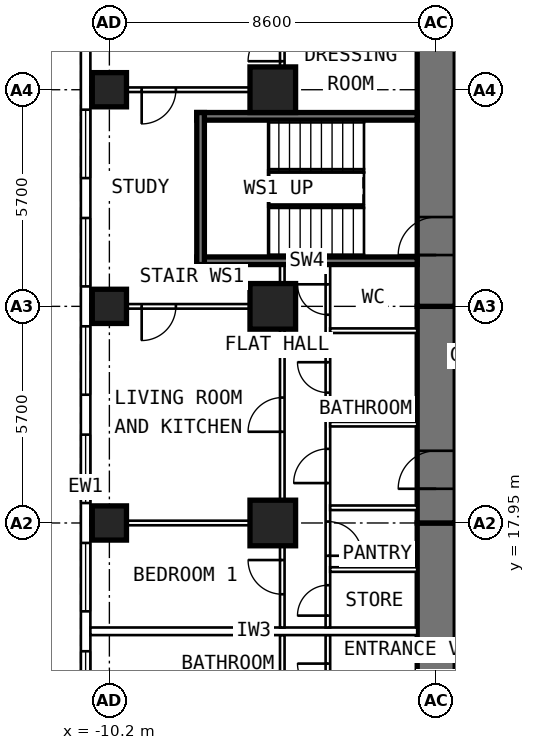
"""IFC4 building model, lengths in metres.
Left out: names, types, materials, properties, quantities, classifications, styles, units other than length and angle.
Written with IfcOpenShell. Run it as: python <this file> out.ifc"""

import sys

from ifc_helpers import new_model, si_unit, direction, frame, frame_2d, origin, origin_2d, place, context, subcontext, project, spatial, rectangle, extrude, element, fill, save


model = new_model("IFC4")
c1 = context("Model", 3, precision=1e-05, world=origin(), true_north=direction((0.0, 1.0)))
c2 = subcontext(c1, "Body", "Model", "MODEL_VIEW")
j1 = project(units=[si_unit("LENGTHUNIT", "METRE"), si_unit("PLANEANGLEUNIT", "RADIAN")], contexts=[c1])
p1 = place(None, origin())
s1 = spatial("IfcSite", under=j1, at=p1, CompositionType="ELEMENT")
p2 = place(p1, origin())
s2 = spatial("IfcBuilding", under=s1, at=p2, CompositionType="ELEMENT")
p3 = place(p2, frame((0.0, 0.0, 98.8)))
s3 = spatial("IfcBuildingStorey", under=s2, at=p3, CompositionType="ELEMENT", Elevation=98.8)
for number, where, z_axis, x_axis in (
    (1, (-10.2, 17.95, 0.0), (0.0, 0.0, 1.0), (0.0, 1.0, 0.0)),
    (2, (-10.2, 23.65, 0.0), (0.0, 0.0, 1.0), (0.0, 1.0, 0.0)),
    (3, (-10.2, 29.35, 0.0), (0.0, 0.0, 1.0), (0.0, 1.0, 0.0)),
):
    element("IfcColumn", number, at=place(p3, frame(where, z_axis=z_axis, x_axis=x_axis)), inside=s3, PredefinedType="COLUMN", context=c2, shape_type="SweptSolid", body=[
        extrude(rectangle(XDim=0.9, YDim=0.9, at=origin_2d()), origin(), (0.0, 0.0, 1.0), 3.6),
    ])
for number, where, z_axis, x_axis in (
    (4, (-5.9, 17.95, 0.0), (0.0, 0.0, 1.0), (0.0, 1.0, 0.0)),
    (5, (-5.9, 23.65, 0.0), (0.0, 0.0, 1.0), (0.0, 1.0, 0.0)),
    (6, (-5.9, 29.35, 0.0), (0.0, 0.0, 1.0), (0.0, 1.0, 0.0)),
):
    element("IfcColumn", number, at=place(p3, frame(where, z_axis=z_axis, x_axis=x_axis)), inside=s3, PredefinedType="COLUMN", context=c2, shape_type="SweptSolid", body=[
        extrude(rectangle(XDim=1.2, YDim=1.2, at=origin_2d()), origin(), (0.0, 0.0, 1.0), 3.6),
    ])
p4 = place(p3, frame((-1.6, 9.6, 0.0), z_axis=(0.0, 0.0, 1.0), x_axis=(0.0, 1.0, 0.0)))
e7 = element("IfcWall", 7, at=p4, inside=s3, PredefinedType="SHEAR", context=c2, shape_type="SweptSolid", body=[
    extrude(rectangle(XDim=8.35, YDim=1.0, at=frame_2d((4.175, 0.0))), origin(), (0.0, 0.0, 1.0), 3.6),
])
p5 = place(p4, frame((1.3, 0.0, 0.0)))
e8 = element("IfcOpeningElement", 8, at=p5, cuts=e7, PredefinedType="OPENING", context=c2, shape_type="SweptSolid", body=[
    extrude(rectangle(XDim=1.0, YDim=2.1, at=frame_2d((0.5, 1.05))), frame((0.0, 0.512, 0.0), z_axis=(0.0, -1.0, 0.0), x_axis=(1.0, 0.0, 0.0)), (0.0, 0.0, 1.0), 1.024),
])
p6 = place(p3, frame((-1.6, 17.95, 0.0), z_axis=(0.0, 0.0, 1.0), x_axis=(0.0, 1.0, 0.0)))
e9 = element("IfcWall", 9, at=p6, inside=s3, PredefinedType="SHEAR", context=c2, shape_type="SweptSolid", body=[
    extrude(rectangle(XDim=5.7, YDim=1.0, at=frame_2d((2.85, 0.0))), origin(), (0.0, 0.0, 1.0), 3.6),
])
p7 = place(p6, frame((0.9, 0.0, 0.0)))
e10 = element("IfcOpeningElement", 10, at=p7, cuts=e9, PredefinedType="OPENING", context=c2, shape_type="SweptSolid", body=[
    extrude(rectangle(XDim=1.0, YDim=2.1, at=frame_2d((0.5, 1.05))), frame((0.0, 0.512, 0.0), z_axis=(0.0, -1.0, 0.0), x_axis=(1.0, 0.0, 0.0)), (0.0, 0.0, 1.0), 1.024),
])
p8 = place(p3, frame((-1.6, 23.65, 0.0), z_axis=(0.0, 0.0, 1.0), x_axis=(0.0, 1.0, 0.0)))
e11 = element("IfcWall", 11, at=p8, inside=s3, PredefinedType="SHEAR", context=c2, shape_type="SweptSolid", body=[
    extrude(rectangle(XDim=10.745, YDim=1.0, at=frame_2d((5.373, 0.0))), origin(), (0.0, 0.0, 1.0), 3.6),
])
p9 = place(p8, frame((1.35, 0.0, 0.0)))
e12 = element("IfcOpeningElement", 12, at=p9, cuts=e11, PredefinedType="OPENING", context=c2, shape_type="SweptSolid", body=[
    extrude(rectangle(XDim=1.0, YDim=2.1, at=frame_2d((0.5, 1.05))), frame((0.0, 0.512, 0.0), z_axis=(0.0, -1.0, 0.0), x_axis=(1.0, 0.0, 0.0)), (0.0, 0.0, 1.0), 1.024),
])
p10 = place(p3, frame((-10.825, 6.148, 0.0), z_axis=(0.0, 0.0, 1.0), x_axis=(0.0, 1.0, 0.0)))
e13 = element("IfcWall", 13, at=p10, inside=s3, PredefinedType="SOLIDWALL", context=c2, shape_type="SweptSolid", body=[
    extrude(rectangle(XDim=25.487, YDim=0.25, at=frame_2d((12.744, 0.0))), origin(), (0.0, 0.0, 1.0), 3.35),
])
p11 = place(p10, frame((0.927, 0.0, 0.8)))
e14 = element("IfcOpeningElement", 14, at=p11, cuts=e13, PredefinedType="OPENING", context=c2, shape_type="SweptSolid", body=[
    extrude(rectangle(XDim=1.8, YDim=1.8, at=frame_2d((0.9, 0.9))), frame((0.0, 0.137, 0.0), z_axis=(0.0, -1.0, 0.0), x_axis=(1.0, 0.0, 0.0)), (0.0, 0.0, 1.0), 0.274),
])
p12 = place(p10, frame((3.777, 0.0, 0.8)))
e15 = element("IfcOpeningElement", 15, at=p12, cuts=e13, PredefinedType="OPENING", context=c2, shape_type="SweptSolid", body=[
    extrude(rectangle(XDim=1.8, YDim=1.8, at=frame_2d((0.9, 0.9))), frame((0.0, 0.137, 0.0), z_axis=(0.0, -1.0, 0.0), x_axis=(1.0, 0.0, 0.0)), (0.0, 0.0, 1.0), 0.274),
])
p13 = place(p10, frame((6.627, 0.0, 0.8)))
e16 = element("IfcOpeningElement", 16, at=p13, cuts=e13, PredefinedType="OPENING", context=c2, shape_type="SweptSolid", body=[
    extrude(rectangle(XDim=1.8, YDim=1.8, at=frame_2d((0.9, 0.9))), frame((0.0, 0.137, 0.0), z_axis=(0.0, -1.0, 0.0), x_axis=(1.0, 0.0, 0.0)), (0.0, 0.0, 1.0), 0.274),
])
p14 = place(p10, frame((9.477, 0.0, 0.8)))
e17 = element("IfcOpeningElement", 17, at=p14, cuts=e13, PredefinedType="OPENING", context=c2, shape_type="SweptSolid", body=[
    extrude(rectangle(XDim=1.8, YDim=1.8, at=frame_2d((0.9, 0.9))), frame((0.0, 0.137, 0.0), z_axis=(0.0, -1.0, 0.0), x_axis=(1.0, 0.0, 0.0)), (0.0, 0.0, 1.0), 0.274),
])
p15 = place(p10, frame((12.327, 0.0, 0.8)))
e18 = element("IfcOpeningElement", 18, at=p15, cuts=e13, PredefinedType="OPENING", context=c2, shape_type="SweptSolid", body=[
    extrude(rectangle(XDim=1.8, YDim=1.8, at=frame_2d((0.9, 0.9))), frame((0.0, 0.137, 0.0), z_axis=(0.0, -1.0, 0.0), x_axis=(1.0, 0.0, 0.0)), (0.0, 0.0, 1.0), 0.274),
])
p16 = place(p10, frame((15.177, 0.0, 0.8)))
e19 = element("IfcOpeningElement", 19, at=p16, cuts=e13, PredefinedType="OPENING", context=c2, shape_type="SweptSolid", body=[
    extrude(rectangle(XDim=1.8, YDim=1.8, at=frame_2d((0.9, 0.9))), frame((0.0, 0.137, 0.0), z_axis=(0.0, -1.0, 0.0), x_axis=(1.0, 0.0, 0.0)), (0.0, 0.0, 1.0), 0.274),
])
p17 = place(p10, frame((18.027, 0.0, 0.8)))
e20 = element("IfcOpeningElement", 20, at=p17, cuts=e13, PredefinedType="OPENING", context=c2, shape_type="SweptSolid", body=[
    extrude(rectangle(XDim=1.8, YDim=1.8, at=frame_2d((0.9, 0.9))), frame((0.0, 0.137, 0.0), z_axis=(0.0, -1.0, 0.0), x_axis=(1.0, 0.0, 0.0)), (0.0, 0.0, 1.0), 0.274),
])
p18 = place(p10, frame((20.877, 0.0, 0.8)))
e21 = element("IfcOpeningElement", 21, at=p18, cuts=e13, PredefinedType="OPENING", context=c2, shape_type="SweptSolid", body=[
    extrude(rectangle(XDim=1.8, YDim=1.8, at=frame_2d((0.9, 0.9))), frame((0.0, 0.137, 0.0), z_axis=(0.0, -1.0, 0.0), x_axis=(1.0, 0.0, 0.0)), (0.0, 0.0, 1.0), 0.274),
])
p19 = place(p3, frame((-4.45, 10.1, 0.0), z_axis=(0.0, 0.0, 1.0), x_axis=(0.0, 1.0, 0.0)))
e22 = element("IfcWall", 22, at=p19, inside=s3, PredefinedType="PARTITIONING", context=c2, shape_type="SweptSolid", body=[
    extrude(rectangle(XDim=4.9, YDim=0.12, at=frame_2d((2.45, 0.0))), origin(), (0.0, 0.0, 1.0), 3.35),
])
p20 = place(p19, frame((0.75, 0.0, 0.0)))
e23 = element("IfcOpeningElement", 23, at=p20, cuts=e22, PredefinedType="OPENING", context=c2, shape_type="SweptSolid", body=[
    extrude(rectangle(XDim=0.9, YDim=2.1, at=frame_2d((0.45, 1.05))), frame((0.0, 0.072, 0.0), z_axis=(0.0, -1.0, 0.0), x_axis=(1.0, 0.0, 0.0)), (0.0, 0.0, 1.0), 0.144),
])
p21 = place(p19, frame((3.35, 0.0, 0.0)))
e24 = element("IfcOpeningElement", 24, at=p21, cuts=e22, PredefinedType="OPENING", context=c2, shape_type="SweptSolid", body=[
    extrude(rectangle(XDim=0.8, YDim=2.1, at=frame_2d((0.4, 1.05))), frame((0.0, 0.072, 0.0), z_axis=(0.0, -1.0, 0.0), x_axis=(1.0, 0.0, 0.0)), (0.0, 0.0, 1.0), 0.144),
])
p22 = place(p3, frame((-5.65, 9.6, 0.0), z_axis=(0.0, 0.0, 1.0), x_axis=(0.0, 1.0, 0.0)))
e25 = element("IfcWall", 25, at=p22, inside=s3, PredefinedType="PARTITIONING", context=c2, shape_type="SweptSolid", body=[
    extrude(rectangle(XDim=5.4, YDim=0.12, at=frame_2d((2.7, 0.0))), origin(), (0.0, 0.0, 1.0), 3.35),
])
p23 = place(p22, frame((3.4, 0.0, 0.0)))
e26 = element("IfcOpeningElement", 26, at=p23, cuts=e25, PredefinedType="OPENING", context=c2, shape_type="SweptSolid", body=[
    extrude(rectangle(XDim=0.9, YDim=2.1, at=frame_2d((0.45, 1.05))), frame((0.0, 0.072, 0.0), z_axis=(0.0, -1.0, 0.0), x_axis=(1.0, 0.0, 0.0)), (0.0, 0.0, 1.0), 0.144),
])
p24 = place(p3, frame((-4.45, 15.2, 0.0), z_axis=(0.0, 0.0, 1.0), x_axis=(0.0, 1.0, 0.0)))
e27 = element("IfcWall", 27, at=p24, inside=s3, PredefinedType="PARTITIONING", context=c2, shape_type="SweptSolid", body=[
    extrude(rectangle(XDim=9.55, YDim=0.12, at=frame_2d((4.775, 0.0))), origin(), (0.0, 0.0, 1.0), 3.35),
])
p25 = place(p24, frame((0.312, 0.0, 0.0)))
e28 = element("IfcOpeningElement", 28, at=p25, cuts=e27, PredefinedType="OPENING", context=c2, shape_type="SweptSolid", body=[
    extrude(rectangle(XDim=0.8, YDim=2.1, at=frame_2d((0.4, 1.05))), frame((0.0, 0.072, 0.0), z_axis=(0.0, -1.0, 0.0), x_axis=(1.0, 0.0, 0.0)), (0.0, 0.0, 1.0), 0.144),
])
p26 = place(p24, frame((1.887, 0.0, 0.0)))
e29 = element("IfcOpeningElement", 29, at=p26, cuts=e27, PredefinedType="OPENING", context=c2, shape_type="SweptSolid", body=[
    extrude(rectangle(XDim=0.9, YDim=2.1, at=frame_2d((0.45, 1.05))), frame((0.0, 0.072, 0.0), z_axis=(0.0, -1.0, 0.0), x_axis=(1.0, 0.0, 0.0)), (0.0, 0.0, 1.0), 0.144),
])
p27 = place(p24, frame((3.8, 0.0, 0.0)))
e30 = element("IfcOpeningElement", 30, at=p27, cuts=e27, PredefinedType="OPENING", context=c2, shape_type="SweptSolid", body=[
    extrude(rectangle(XDim=0.9, YDim=2.1, at=frame_2d((0.45, 1.05))), frame((0.0, 0.072, 0.0), z_axis=(0.0, -1.0, 0.0), x_axis=(1.0, 0.0, 0.0)), (0.0, 0.0, 1.0), 0.144),
])
p28 = place(p24, frame((6.18, 0.0, 0.0)))
e31 = element("IfcOpeningElement", 31, at=p28, cuts=e27, PredefinedType="OPENING", context=c2, shape_type="SweptSolid", body=[
    extrude(rectangle(XDim=0.8, YDim=2.1, at=frame_2d((0.4, 1.05))), frame((0.0, 0.072, 0.0), z_axis=(0.0, -1.0, 0.0), x_axis=(1.0, 0.0, 0.0)), (0.0, 0.0, 1.0), 0.144),
])
p29 = place(p24, frame((8.23, 0.0, 0.0)))
e32 = element("IfcOpeningElement", 32, at=p29, cuts=e27, PredefinedType="OPENING", context=c2, shape_type="SweptSolid", body=[
    extrude(rectangle(XDim=0.8, YDim=2.1, at=frame_2d((0.4, 1.05))), frame((0.0, 0.072, 0.0), z_axis=(0.0, -1.0, 0.0), x_axis=(1.0, 0.0, 0.0)), (0.0, 0.0, 1.0), 0.144),
])
p30 = place(p3, frame((-5.65, 15.2, 0.0), z_axis=(0.0, 0.0, 1.0), x_axis=(0.0, 1.0, 0.0)))
e33 = element("IfcWall", 33, at=p30, inside=s3, PredefinedType="PARTITIONING", context=c2, shape_type="SweptSolid", body=[
    extrude(rectangle(XDim=9.55, YDim=0.12, at=frame_2d((4.775, 0.0))), origin(), (0.0, 0.0, 1.0), 3.35),
])
p31 = place(p30, frame((0.875, 0.0, 0.0)))
e34 = element("IfcOpeningElement", 34, at=p31, cuts=e33, PredefinedType="OPENING", context=c2, shape_type="SweptSolid", body=[
    extrude(rectangle(XDim=0.9, YDim=2.1, at=frame_2d((0.45, 1.05))), frame((0.0, 0.072, 0.0), z_axis=(0.0, -1.0, 0.0), x_axis=(1.0, 0.0, 0.0)), (0.0, 0.0, 1.0), 0.144),
])
p32 = place(p30, frame((5.15, 0.0, 0.0)))
e35 = element("IfcOpeningElement", 35, at=p32, cuts=e33, PredefinedType="OPENING", context=c2, shape_type="SweptSolid", body=[
    extrude(rectangle(XDim=0.9, YDim=2.1, at=frame_2d((0.45, 1.05))), frame((0.0, 0.072, 0.0), z_axis=(0.0, -1.0, 0.0), x_axis=(1.0, 0.0, 0.0)), (0.0, 0.0, 1.0), 0.144),
])
p33 = place(p3, frame((-5.71, 17.95, 0.0), z_axis=(0.0, 0.0, 1.0), x_axis=(-1.0, 0.0, 0.0)))
e36 = element("IfcWall", 36, at=p33, inside=s3, PredefinedType="PARTITIONING", context=c2, shape_type="SweptSolid", body=[
    extrude(rectangle(XDim=4.99, YDim=0.12, at=frame_2d((2.495, 0.0))), origin(), (0.0, 0.0, 1.0), 2.45),
])
for number, where, z_axis, x_axis in (
    (37, (-2.1, 16.725, 0.0), (0.0, 0.0, 1.0), (-1.0, 0.0, 0.0)),
    (38, (-2.1, 18.35, 0.0), (0.0, 0.0, 1.0), (-1.0, 0.0, 0.0)),
    (39, (-2.1, 20.55, 0.0), (0.0, 0.0, 1.0), (-1.0, 0.0, 0.0)),
    (40, (-2.1, 23.01, 0.0), (0.0, 0.0, 1.0), (-1.0, 0.0, 0.0)),
):
    element("IfcWall", number, at=place(p3, frame(where, z_axis=z_axis, x_axis=x_axis)), inside=s3, PredefinedType="PARTITIONING", context=c2, shape_type="SweptSolid", body=[
        extrude(rectangle(XDim=2.29, YDim=0.12, at=frame_2d((1.145, 0.0))), origin(), (0.0, 0.0, 1.0), 3.35),
    ])
p34 = place(p3, frame((-2.1, 15.1, 0.0), z_axis=(0.0, 0.0, 1.0), x_axis=(-1.0, 0.0, 0.0)))
e41 = element("IfcWall", 41, at=p34, inside=s3, PredefinedType="PARTITIONING", context=c2, shape_type="SweptSolid", body=[
    extrude(rectangle(XDim=8.6, YDim=0.2, at=frame_2d((4.3, 0.0))), origin(), (0.0, 0.0, 1.0), 3.35),
])
p35 = place(p3, frame((-5.71, 23.65, 0.0), z_axis=(0.0, 0.0, 1.0), x_axis=(-1.0, 0.0, 0.0)))
e42 = element("IfcWall", 42, at=p35, inside=s3, PredefinedType="PARTITIONING", context=c2, shape_type="SweptSolid", body=[
    extrude(rectangle(XDim=4.99, YDim=0.12, at=frame_2d((2.495, 0.0))), origin(), (0.0, 0.0, 1.0), 2.45),
])
p36 = place(p35, frame((2.74, 0.0, 0.0)))
e43 = element("IfcOpeningElement", 43, at=p36, cuts=e42, PredefinedType="OPENING", context=c2, shape_type="SweptSolid", body=[
    extrude(rectangle(XDim=0.9, YDim=2.1, at=frame_2d((0.45, 1.05))), frame((0.0, 0.072, 0.0), z_axis=(0.0, -1.0, 0.0), x_axis=(1.0, 0.0, 0.0)), (0.0, 0.0, 1.0), 0.144),
])
p37 = place(p3, frame((-5.71, 29.35, 0.0), z_axis=(0.0, 0.0, 1.0), x_axis=(-1.0, 0.0, 0.0)))
e44 = element("IfcWall", 44, at=p37, inside=s3, PredefinedType="PARTITIONING", context=c2, shape_type="SweptSolid", body=[
    extrude(rectangle(XDim=4.99, YDim=0.12, at=frame_2d((2.495, 0.0))), origin(), (0.0, 0.0, 1.0), 2.45),
])
p38 = place(p37, frame((2.74, 0.0, 0.0)))
e45 = element("IfcOpeningElement", 45, at=p38, cuts=e44, PredefinedType="OPENING", context=c2, shape_type="SweptSolid", body=[
    extrude(rectangle(XDim=0.9, YDim=2.1, at=frame_2d((0.45, 1.05))), frame((0.0, 0.072, 0.0), z_axis=(0.0, -1.0, 0.0), x_axis=(1.0, 0.0, 0.0)), (0.0, 0.0, 1.0), 0.144),
])
p39 = place(p3, frame((-5.65, 28.95, 0.0), z_axis=(0.0, 0.0, 1.0), x_axis=(0.0, 1.0, 0.0)))
e46 = element("IfcWall", 46, at=p39, inside=s3, PredefinedType="PARTITIONING", context=c2, shape_type="SweptSolid", body=[
    extrude(rectangle(XDim=5.445, YDim=0.12, at=frame_2d((2.723, 0.0))), origin(), (0.0, 0.0, 1.0), 3.35),
])
p40 = place(p39, frame((1.15, 0.0, 0.0)))
e47 = element("IfcOpeningElement", 47, at=p40, cuts=e46, PredefinedType="OPENING", context=c2, shape_type="SweptSolid", body=[
    extrude(rectangle(XDim=0.9, YDim=2.1, at=frame_2d((0.45, 1.05))), frame((0.0, 0.072, 0.0), z_axis=(0.0, -1.0, 0.0), x_axis=(1.0, 0.0, 0.0)), (0.0, 0.0, 1.0), 0.144),
])
for number, where, z_axis, x_axis in (
    (48, (-2.1, 24.85, 0.0), (0.0, 0.0, 1.0), (-1.0, 0.0, 0.0)),
    (49, (-2.1, 28.65, 0.0), (0.0, 0.0, 1.0), (-1.0, 0.0, 0.0)),
):
    element("IfcWall", number, at=place(p3, frame(where, z_axis=z_axis, x_axis=x_axis)), inside=s3, PredefinedType="SHEAR", context=c2, shape_type="SweptSolid", body=[
        extrude(rectangle(XDim=5.8, YDim=0.2, at=frame_2d((2.9, 0.0))), origin(), (0.0, 0.0, 1.0), 3.33),
    ])
p41 = place(p3, frame((-7.8, 24.75, 0.0), z_axis=(0.0, 0.0, 1.0), x_axis=(0.0, 1.0, 0.0)))
e50 = element("IfcWall", 50, at=p41, inside=s3, PredefinedType="SHEAR", context=c2, shape_type="SweptSolid", body=[
    extrude(rectangle(XDim=4.0, YDim=0.2, at=frame_2d((2.0, 0.0))), origin(), (0.0, 0.0, 1.0), 3.33),
])
p42 = place(p13, origin())
e51 = element("IfcWindow", 51, at=p42, inside=s3, PartitioningType="SINGLE_PANEL", PredefinedType="WINDOW", context=c2, shape_type="SweptSolid", body=[
    extrude(rectangle(XDim=1.8, YDim=1.8, at=frame_2d((0.9, 0.9))), frame((0.0, 0.03, 0.0), z_axis=(0.0, -1.0, 0.0), x_axis=(1.0, 0.0, 0.0)), (0.0, 0.0, 1.0), 0.06),
])
fill(e16, e51)
p43 = place(p14, origin())
e52 = element("IfcWindow", 52, at=p43, inside=s3, PartitioningType="SINGLE_PANEL", PredefinedType="WINDOW", context=c2, shape_type="SweptSolid", body=[
    extrude(rectangle(XDim=1.8, YDim=1.8, at=frame_2d((0.9, 0.9))), frame((0.0, 0.03, 0.0), z_axis=(0.0, -1.0, 0.0), x_axis=(1.0, 0.0, 0.0)), (0.0, 0.0, 1.0), 0.06),
])
fill(e17, e52)
p44 = place(p15, origin())
e53 = element("IfcWindow", 53, at=p44, inside=s3, PartitioningType="SINGLE_PANEL", PredefinedType="WINDOW", context=c2, shape_type="SweptSolid", body=[
    extrude(rectangle(XDim=1.8, YDim=1.8, at=frame_2d((0.9, 0.9))), frame((0.0, 0.03, 0.0), z_axis=(0.0, -1.0, 0.0), x_axis=(1.0, 0.0, 0.0)), (0.0, 0.0, 1.0), 0.06),
])
fill(e18, e53)
p45 = place(p16, origin())
e54 = element("IfcWindow", 54, at=p45, inside=s3, PartitioningType="SINGLE_PANEL", PredefinedType="WINDOW", context=c2, shape_type="SweptSolid", body=[
    extrude(rectangle(XDim=1.8, YDim=1.8, at=frame_2d((0.9, 0.9))), frame((0.0, 0.03, 0.0), z_axis=(0.0, -1.0, 0.0), x_axis=(1.0, 0.0, 0.0)), (0.0, 0.0, 1.0), 0.06),
])
fill(e19, e54)
p46 = place(p17, origin())
e55 = element("IfcWindow", 55, at=p46, inside=s3, PartitioningType="SINGLE_PANEL", PredefinedType="WINDOW", context=c2, shape_type="SweptSolid", body=[
    extrude(rectangle(XDim=1.8, YDim=1.8, at=frame_2d((0.9, 0.9))), frame((0.0, 0.03, 0.0), z_axis=(0.0, -1.0, 0.0), x_axis=(1.0, 0.0, 0.0)), (0.0, 0.0, 1.0), 0.06),
])
fill(e20, e55)
p47 = place(p18, origin())
e56 = element("IfcWindow", 56, at=p47, inside=s3, PartitioningType="SINGLE_PANEL", PredefinedType="WINDOW", context=c2, shape_type="SweptSolid", body=[
    extrude(rectangle(XDim=1.8, YDim=1.8, at=frame_2d((0.9, 0.9))), frame((0.0, 0.03, 0.0), z_axis=(0.0, -1.0, 0.0), x_axis=(1.0, 0.0, 0.0)), (0.0, 0.0, 1.0), 0.06),
])
fill(e21, e56)
p48 = place(p21, origin())
e57 = element("IfcDoor", 57, at=p48, inside=s3, OperationType="SINGLE_SWING_RIGHT", PredefinedType="DOOR", context=c2, shape_type="SweptSolid", body=[
    extrude(rectangle(XDim=0.8, YDim=2.1, at=frame_2d((0.4, 1.05))), frame((0.0, 0.025, 0.0), z_axis=(0.0, -1.0, 0.0), x_axis=(1.0, 0.0, 0.0)), (0.0, 0.0, 1.0), 0.05),
])
fill(e24, e57)
p49 = place(p7, origin())
e58 = element("IfcDoor", 58, at=p49, inside=s3, OperationType="SINGLE_SWING_LEFT", PredefinedType="DOOR", context=c2, shape_type="SweptSolid", body=[
    extrude(rectangle(XDim=1.0, YDim=2.1, at=frame_2d((0.5, 1.05))), frame((0.0, 0.25, 0.0), z_axis=(0.0, -1.0, 0.0), x_axis=(1.0, 0.0, 0.0)), (0.0, 0.0, 1.0), 0.5),
])
fill(e10, e58)
p50 = place(p31, origin())
e59 = element("IfcDoor", 59, at=p50, inside=s3, OperationType="SINGLE_SWING_RIGHT", PredefinedType="DOOR", context=c2, shape_type="SweptSolid", body=[
    extrude(rectangle(XDim=0.9, YDim=2.1, at=frame_2d((0.45, 1.05))), frame((0.0, 0.025, 0.0), z_axis=(0.0, -1.0, 0.0), x_axis=(1.0, 0.0, 0.0)), (0.0, 0.0, 1.0), 0.05),
])
fill(e34, e59)
p51 = place(p32, origin())
e60 = element("IfcDoor", 60, at=p51, inside=s3, OperationType="SINGLE_SWING_LEFT", PredefinedType="DOOR", context=c2, shape_type="SweptSolid", body=[
    extrude(rectangle(XDim=0.9, YDim=2.1, at=frame_2d((0.45, 1.05))), frame((0.0, 0.025, 0.0), z_axis=(0.0, -1.0, 0.0), x_axis=(1.0, 0.0, 0.0)), (0.0, 0.0, 1.0), 0.05),
])
fill(e35, e60)
p52 = place(p25, origin())
e61 = element("IfcDoor", 61, at=p52, inside=s3, OperationType="SINGLE_SWING_LEFT", PredefinedType="DOOR", context=c2, shape_type="SweptSolid", body=[
    extrude(rectangle(XDim=0.8, YDim=2.1, at=frame_2d((0.4, 1.05))), frame((0.0, 0.025, 0.0), z_axis=(0.0, -1.0, 0.0), x_axis=(1.0, 0.0, 0.0)), (0.0, 0.0, 1.0), 0.05),
])
fill(e28, e61)
p53 = place(p26, frame((0.9, 0.0, 0.0), z_axis=(0.0, 0.0, 1.0), x_axis=(-1.0, 0.0, 0.0)))
e62 = element("IfcDoor", 62, at=p53, inside=s3, OperationType="SINGLE_SWING_RIGHT", PredefinedType="DOOR", context=c2, shape_type="SweptSolid", body=[
    extrude(rectangle(XDim=0.9, YDim=2.1, at=frame_2d((0.45, 1.05))), frame((0.0, 0.025, 0.0), z_axis=(0.0, -1.0, 0.0), x_axis=(1.0, 0.0, 0.0)), (0.0, 0.0, 1.0), 0.05),
])
fill(e29, e62)
p54 = place(p27, origin())
e63 = element("IfcDoor", 63, at=p54, inside=s3, OperationType="SINGLE_SWING_LEFT", PredefinedType="DOOR", context=c2, shape_type="SweptSolid", body=[
    extrude(rectangle(XDim=0.9, YDim=2.1, at=frame_2d((0.45, 1.05))), frame((0.0, 0.025, 0.0), z_axis=(0.0, -1.0, 0.0), x_axis=(1.0, 0.0, 0.0)), (0.0, 0.0, 1.0), 0.05),
])
fill(e30, e63)
p55 = place(p28, origin())
e64 = element("IfcDoor", 64, at=p55, inside=s3, OperationType="SINGLE_SWING_RIGHT", PredefinedType="DOOR", context=c2, shape_type="SweptSolid", body=[
    extrude(rectangle(XDim=0.8, YDim=2.1, at=frame_2d((0.4, 1.05))), frame((0.0, 0.025, 0.0), z_axis=(0.0, -1.0, 0.0), x_axis=(1.0, 0.0, 0.0)), (0.0, 0.0, 1.0), 0.05),
])
fill(e31, e64)
p56 = place(p29, origin())
e65 = element("IfcDoor", 65, at=p56, inside=s3, OperationType="SINGLE_SWING_RIGHT", PredefinedType="DOOR", context=c2, shape_type="SweptSolid", body=[
    extrude(rectangle(XDim=0.8, YDim=2.1, at=frame_2d((0.4, 1.05))), frame((0.0, 0.025, 0.0), z_axis=(0.0, -1.0, 0.0), x_axis=(1.0, 0.0, 0.0)), (0.0, 0.0, 1.0), 0.05),
])
fill(e32, e65)
p57 = place(p38, origin())
e66 = element("IfcDoor", 66, at=p57, inside=s3, OperationType="SINGLE_SWING_RIGHT", PredefinedType="DOOR", context=c2, shape_type="SweptSolid", body=[
    extrude(rectangle(XDim=0.9, YDim=2.1, at=frame_2d((0.45, 1.05))), frame((0.0, 0.025, 0.0), z_axis=(0.0, -1.0, 0.0), x_axis=(1.0, 0.0, 0.0)), (0.0, 0.0, 1.0), 0.05),
])
fill(e45, e66)
p58 = place(p40, origin())
e67 = element("IfcDoor", 67, at=p58, inside=s3, OperationType="SINGLE_SWING_LEFT", PredefinedType="DOOR", context=c2, shape_type="SweptSolid", body=[
    extrude(rectangle(XDim=0.9, YDim=2.1, at=frame_2d((0.45, 1.05))), frame((0.0, 0.025, 0.0), z_axis=(0.0, -1.0, 0.0), x_axis=(1.0, 0.0, 0.0)), (0.0, 0.0, 1.0), 0.05),
])
fill(e47, e67)
p59 = place(p36, origin())
e68 = element("IfcDoor", 68, at=p59, inside=s3, OperationType="SINGLE_SWING_RIGHT", PredefinedType="DOOR", context=c2, shape_type="SweptSolid", body=[
    extrude(rectangle(XDim=0.9, YDim=2.1, at=frame_2d((0.45, 1.05))), frame((0.0, 0.025, 0.0), z_axis=(0.0, -1.0, 0.0), x_axis=(1.0, 0.0, 0.0)), (0.0, 0.0, 1.0), 0.05),
])
fill(e43, e68)
p60 = place(p9, origin())
e69 = element("IfcDoor", 69, at=p60, inside=s3, OperationType="SINGLE_SWING_LEFT", PredefinedType="DOOR", context=c2, shape_type="SweptSolid", body=[
    extrude(rectangle(XDim=1.0, YDim=2.1, at=frame_2d((0.5, 1.05))), frame((0.0, 0.25, 0.0), z_axis=(0.0, -1.0, 0.0), x_axis=(1.0, 0.0, 0.0)), (0.0, 0.0, 1.0), 0.5),
])
fill(e12, e69)
save(model, sys.argv[1])
